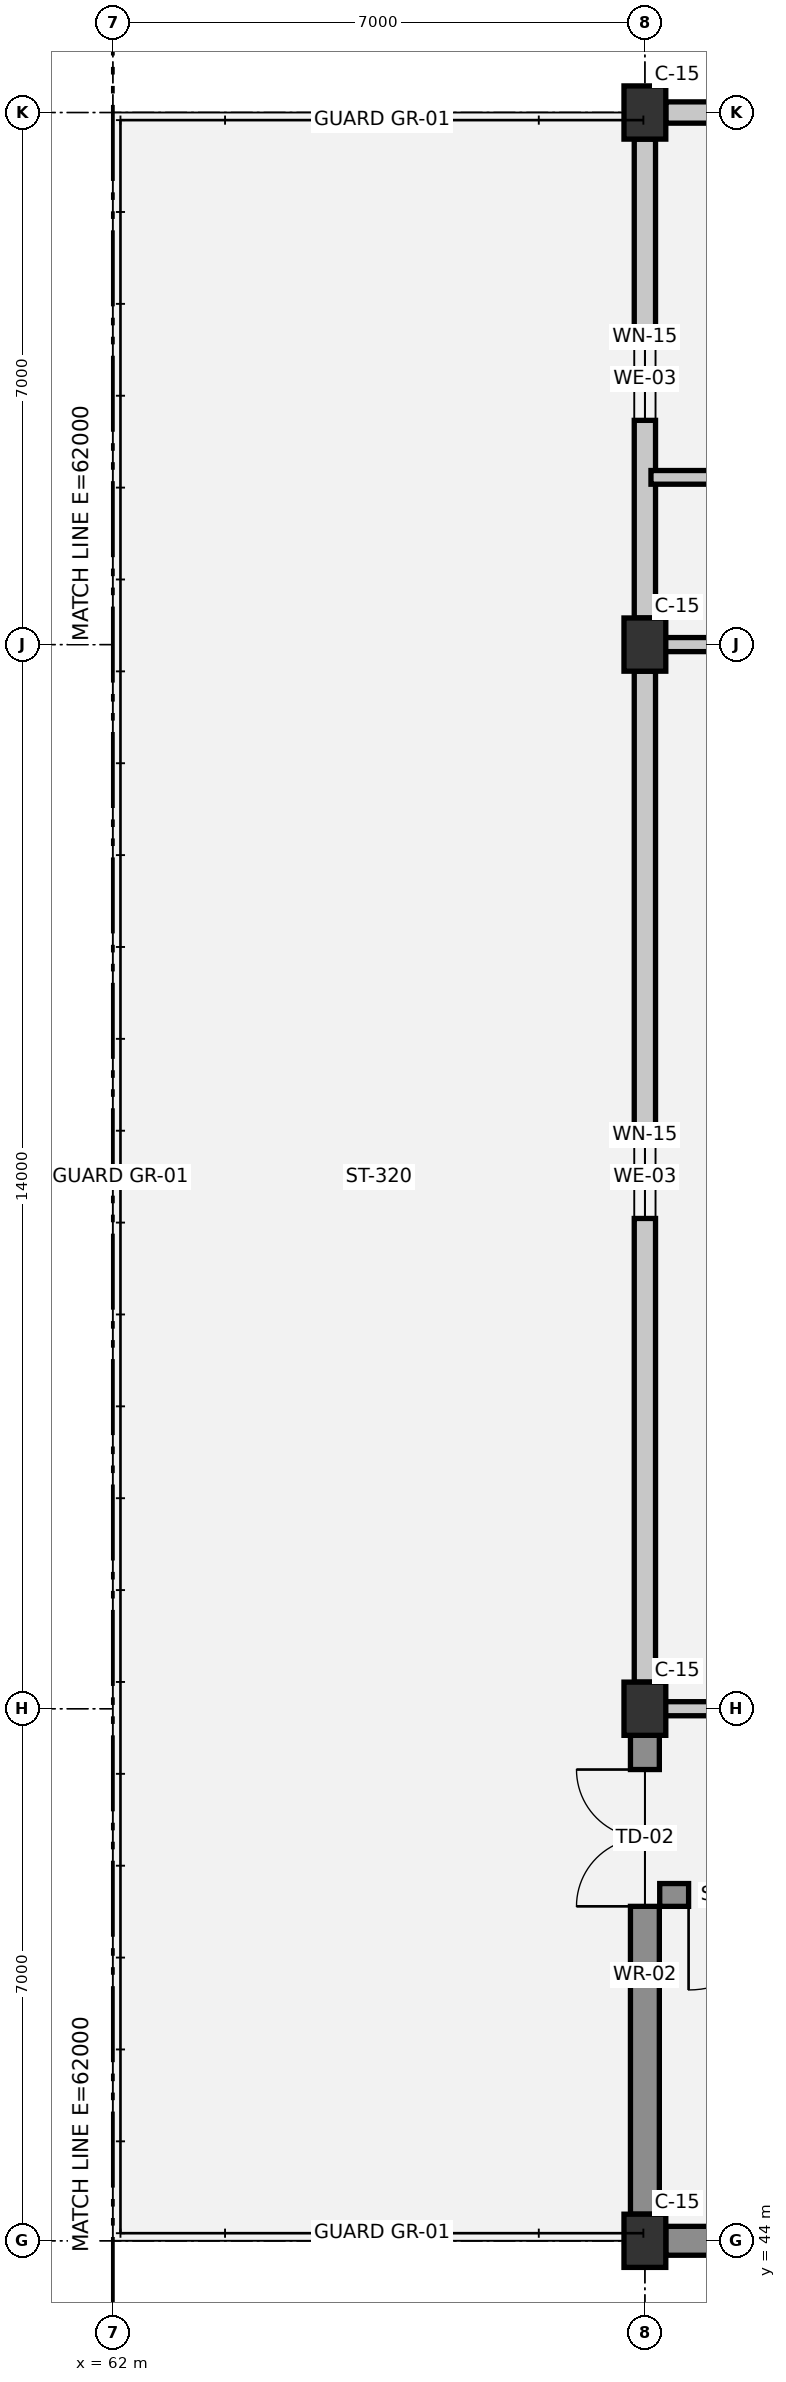
"""IFC4 building model, lengths in metres.
Left out: names, types, materials, properties, quantities, classifications, styles, units other than length and angle.
Written with IfcOpenShell. Run it as: python <this file> out.ifc"""

import sys

from ifc_helpers import new_model, si_unit, direction, frame, frame_2d, origin, origin_2d, place, context, subcontext, project, spatial, rectangle, extrude, element, fill, save


model = new_model("IFC4")
c1 = context("Model", 3, precision=1e-05, world=origin(), true_north=direction((0.0, 1.0)))
c2 = subcontext(c1, "Body", "Model", "MODEL_VIEW")
j1 = project(units=[si_unit("LENGTHUNIT", "METRE"), si_unit("PLANEANGLEUNIT", "RADIAN")], contexts=[c1])
p1 = place(None, origin())
s1 = spatial("IfcSite", under=j1, at=p1, CompositionType="ELEMENT")
p2 = place(p1, origin())
s2 = spatial("IfcBuilding", under=s1, at=p2, CompositionType="ELEMENT")
p3 = place(p2, frame((0.0, 0.0, 33.3)))
s3 = spatial("IfcBuildingStorey", under=s2, at=p3, CompositionType="ELEMENT", Elevation=33.3)
for number, where, z_axis, x_axis in (
    (1, (69.0, 44.0, 0.0), (0.0, 0.0, 1.0), (1.0, 0.0, 0.0)),
    (2, (69.0, 51.0, 0.0), (0.0, 0.0, 1.0), (1.0, 0.0, 0.0)),
    (3, (69.0, 65.0, 0.0), (0.0, 0.0, 1.0), (1.0, 0.0, 0.0)),
    (4, (69.0, 72.0, 0.0), (0.0, 0.0, 1.0), (1.0, 0.0, 0.0)),
):
    element("IfcColumn", number, at=place(p3, frame(where, z_axis=z_axis, x_axis=x_axis)), inside=s3, PredefinedType="COLUMN", context=c2, shape_type="SweptSolid", body=[
        extrude(rectangle(XDim=0.55, YDim=0.7, at=origin_2d()), origin(), (0.0, 0.0, 1.0), 3.75),
    ])
p4 = place(p3, frame((69.0, 44.35, 0.0), z_axis=(0.0, 0.0, 1.0), x_axis=(0.0, 1.0, 0.0)))
e5 = element("IfcWall", 5, at=p4, inside=s3, PredefinedType="STANDARD", context=c2, shape_type="SweptSolid", body=[
    extrude(rectangle(XDim=6.3, YDim=0.38, at=frame_2d((3.15, 0.0))), origin(), (0.0, 0.0, 1.0), 2.6),
])
p5 = place(p4, frame((4.05, 0.0, 0.0)))
e6 = element("IfcOpeningElement", 6, at=p5, cuts=e5, PredefinedType="OPENING", context=c2, shape_type="SweptSolid", body=[
    extrude(rectangle(XDim=1.8, YDim=2.2, at=frame_2d((0.9, 1.1))), frame((0.0, 0.2, 0.0), z_axis=(0.0, -1.0, 0.0), x_axis=(1.0, 0.0, 0.0)), (0.0, 0.0, 1.0), 0.4),
])
p6 = place(p3, frame((69.0, 51.35, 0.0), z_axis=(0.0, 0.0, 1.0), x_axis=(0.0, 1.0, 0.0)))
e7 = element("IfcWall", 7, at=p6, inside=s3, PredefinedType="SOLIDWALL", context=c2, shape_type="SweptSolid", body=[
    extrude(rectangle(XDim=13.3, YDim=0.28, at=frame_2d((6.65, 0.0))), origin(), (0.0, 0.0, 1.0), 2.6),
])
p7 = place(p6, frame((6.1, 0.0, 0.9)))
e8 = element("IfcOpeningElement", 8, at=p7, cuts=e7, PredefinedType="OPENING", context=c2, shape_type="SweptSolid", body=[
    extrude(rectangle(XDim=1.1, YDim=1.2, at=frame_2d((0.55, 0.6))), frame((0.0, 0.15, 0.0), z_axis=(0.0, -1.0, 0.0), x_axis=(1.0, 0.0, 0.0)), (0.0, 0.0, 1.0), 0.3),
])
p8 = place(p3, frame((69.0, 65.35, 0.0), z_axis=(0.0, 0.0, 1.0), x_axis=(0.0, 1.0, 0.0)))
e9 = element("IfcWall", 9, at=p8, inside=s3, PredefinedType="SOLIDWALL", context=c2, shape_type="SweptSolid", body=[
    extrude(rectangle(XDim=6.3, YDim=0.28, at=frame_2d((3.15, 0.0))), origin(), (0.0, 0.0, 1.0), 2.6),
])
p9 = place(p8, frame((2.6, 0.0, 0.9)))
e10 = element("IfcOpeningElement", 10, at=p9, cuts=e9, PredefinedType="OPENING", context=c2, shape_type="SweptSolid", body=[
    extrude(rectangle(XDim=1.1, YDim=1.2, at=frame_2d((0.55, 0.6))), frame((0.0, 0.15, 0.0), z_axis=(0.0, -1.0, 0.0), x_axis=(1.0, 0.0, 0.0)), (0.0, 0.0, 1.0), 0.3),
])
p10 = place(p3, frame((69.275, 72.0, 0.0), z_axis=(0.0, 0.0, 1.0), x_axis=(1.0, 0.0, 0.0)))
e11 = element("IfcWall", 11, at=p10, inside=s3, PredefinedType="SOLIDWALL", context=c2, shape_type="SweptSolid", body=[
    extrude(rectangle(XDim=7.45, YDim=0.28, at=frame_2d((3.725, 0.0))), origin(), (0.0, 0.0, 1.0), 2.6),
])
p11 = place(p10, frame((3.175, 0.0, 1.0)))
e12 = element("IfcOpeningElement", 12, at=p11, cuts=e11, PredefinedType="OPENING", context=c2, shape_type="SweptSolid", body=[
    extrude(rectangle(XDim=1.1, YDim=1.2, at=frame_2d((0.55, 0.6))), frame((0.0, 0.15, 0.0), z_axis=(0.0, -1.0, 0.0), x_axis=(1.0, 0.0, 0.0)), (0.0, 0.0, 1.0), 0.3),
])
p12 = place(p3, frame((76.725, 44.0, 0.0), z_axis=(0.0, 0.0, 1.0), x_axis=(-1.0, 0.0, 0.0)))
e13 = element("IfcWall", 13, at=p12, inside=s3, PredefinedType="STANDARD", context=c2, shape_type="SweptSolid", body=[
    extrude(rectangle(XDim=7.45, YDim=0.38, at=frame_2d((3.725, 0.0))), origin(), (0.0, 0.0, 1.0), 2.6),
])
p13 = place(p3, frame((76.85, 48.55, 0.0), z_axis=(0.0, 0.0, 1.0), x_axis=(-1.0, 0.0, 0.0)))
e14 = element("IfcWall", 14, at=p13, inside=s3, PredefinedType="SHEAR", context=c2, shape_type="SweptSolid", body=[
    extrude(rectangle(XDim=7.655, YDim=0.3, at=frame_2d((3.828, 0.0))), origin(), (0.0, 0.0, 1.0), 3.47),
])
p14 = place(p13, frame((6.025, 0.0, 0.0)))
e15 = element("IfcOpeningElement", 15, at=p14, cuts=e14, PredefinedType="OPENING", context=c2, shape_type="SweptSolid", body=[
    extrude(rectangle(XDim=1.25, YDim=2.15, at=frame_2d((0.625, 1.075))), frame((0.0, 0.16, 0.0), z_axis=(0.0, -1.0, 0.0), x_axis=(1.0, 0.0, 0.0)), (0.0, 0.0, 1.0), 0.32),
])
p15 = place(p3, frame((69.08, 51.0, 0.0), z_axis=(0.0, 0.0, 1.0), x_axis=(1.0, 0.0, 0.0)))
e16 = element("IfcWall", 16, at=p15, inside=s3, PredefinedType="PARTITIONING", context=c2, shape_type="SweptSolid", body=[
    extrude(rectangle(XDim=8.12, YDim=0.185, at=frame_2d((4.06, 0.0))), origin(), (0.0, 0.0, 1.0), 2.82),
])
p16 = place(p3, frame((69.08, 65.0, 0.0), z_axis=(0.0, 0.0, 1.0), x_axis=(1.0, 0.0, 0.0)))
e17 = element("IfcWall", 17, at=p16, inside=s3, PredefinedType="PARTITIONING", context=c2, shape_type="SweptSolid", body=[
    extrude(rectangle(XDim=17.48, YDim=0.185, at=frame_2d((8.74, 0.0))), origin(), (0.0, 0.0, 1.0), 2.82),
])
p17 = place(p16, frame((5.593, 0.0, 0.0)))
e18 = element("IfcOpeningElement", 18, at=p17, cuts=e17, PredefinedType="OPENING", context=c2, shape_type="SweptSolid", body=[
    extrude(rectangle(XDim=1.8, YDim=2.3, at=frame_2d((0.9, 1.15))), frame((0.0, 0.103, 0.0), z_axis=(0.0, -1.0, 0.0), x_axis=(1.0, 0.0, 0.0)), (0.0, 0.0, 1.0), 0.205),
])
p18 = place(p3, frame((69.08, 67.2, 0.0), z_axis=(0.0, 0.0, 1.0), x_axis=(1.0, 0.0, 0.0)))
e19 = element("IfcWall", 19, at=p18, inside=s3, PredefinedType="PARTITIONING", context=c2, shape_type="SweptSolid", body=[
    extrude(rectangle(XDim=5.73, YDim=0.18, at=frame_2d((2.865, 0.0))), origin(), (0.0, 0.0, 1.0), 3.39),
])
p19 = place(p18, frame((2.29, 0.0, 0.0)))
e20 = element("IfcOpeningElement", 20, at=p19, cuts=e19, PredefinedType="OPENING", context=c2, shape_type="SweptSolid", body=[
    extrude(rectangle(XDim=1.15, YDim=2.2, at=frame_2d((0.575, 1.1))), frame((0.0, 0.1, 0.0), z_axis=(0.0, -1.0, 0.0), x_axis=(1.0, 0.0, 0.0)), (0.0, 0.0, 1.0), 0.2),
])
p20 = place(p5, origin())
e21 = element("IfcDoor", 21, at=p20, inside=s3, OperationType="DOUBLE_DOOR_SINGLE_SWING", PredefinedType="DOOR", context=c2, shape_type="SweptSolid", body=[
    extrude(rectangle(XDim=1.8, YDim=2.2, at=frame_2d((0.9, 1.1))), frame((0.0, 0.025, 0.0), z_axis=(0.0, -1.0, 0.0), x_axis=(1.0, 0.0, 0.0)), (0.0, 0.0, 1.0), 0.05),
])
fill(e6, e21)
p21 = place(p7, origin())
e22 = element("IfcWindow", 22, at=p21, inside=s3, PartitioningType="SINGLE_PANEL", PredefinedType="WINDOW", context=c2, shape_type="SweptSolid", body=[
    extrude(rectangle(XDim=1.1, YDim=1.2, at=frame_2d((0.55, 0.6))), frame((0.0, 0.03, 0.0), z_axis=(0.0, -1.0, 0.0), x_axis=(1.0, 0.0, 0.0)), (0.0, 0.0, 1.0), 0.06),
])
fill(e8, e22)
p22 = place(p9, origin())
e23 = element("IfcWindow", 23, at=p22, inside=s3, PartitioningType="SINGLE_PANEL", PredefinedType="WINDOW", context=c2, shape_type="SweptSolid", body=[
    extrude(rectangle(XDim=1.1, YDim=1.2, at=frame_2d((0.55, 0.6))), frame((0.0, 0.03, 0.0), z_axis=(0.0, -1.0, 0.0), x_axis=(1.0, 0.0, 0.0)), (0.0, 0.0, 1.0), 0.06),
])
fill(e10, e23)
p23 = place(p14, origin())
e24 = element("IfcDoor", 24, at=p23, inside=s3, OperationType="SINGLE_SWING_RIGHT", PredefinedType="DOOR", context=c2, shape_type="SweptSolid", body=[
    extrude(rectangle(XDim=1.25, YDim=2.15, at=frame_2d((0.625, 1.075))), frame((0.0, 0.025, 0.0), z_axis=(0.0, -1.0, 0.0), x_axis=(1.0, 0.0, 0.0)), (0.0, 0.0, 1.0), 0.05),
])
fill(e15, e24)
save(model, sys.argv[1])
